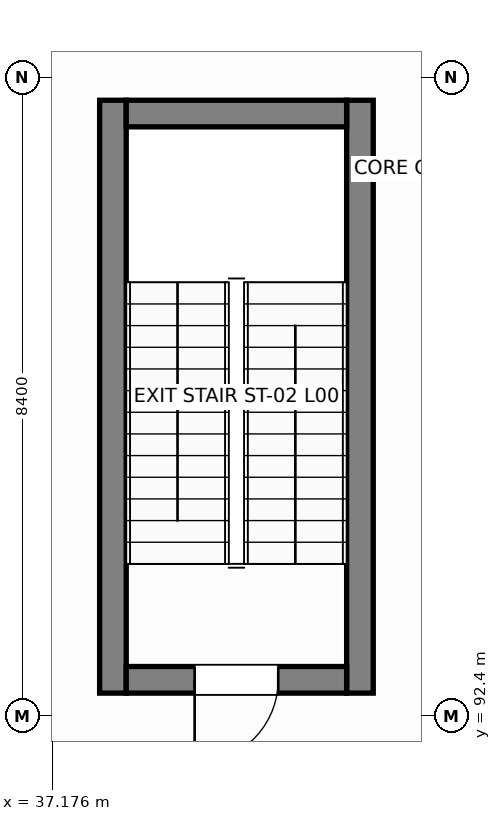
"""IFC4 building model, lengths in metres.
Left out: names, types, materials, properties, quantities, classifications, styles, units other than length and angle.
Written with IfcOpenShell. Run it as: python <this file> out.ifc"""

import sys

from ifc_helpers import new_model, si_unit, direction, frame, frame_2d, origin, place, context, subcontext, project, spatial, rectangle, extrude, element, fill, save


model = new_model("IFC4")
c1 = context("Model", 3, precision=1e-05, world=origin(), true_north=direction((0.0, 1.0)))
c2 = subcontext(c1, "Body", "Model", "MODEL_VIEW")
j1 = project(units=[si_unit("LENGTHUNIT", "METRE"), si_unit("PLANEANGLEUNIT", "RADIAN")], contexts=[c1])
p1 = place(None, origin())
s1 = spatial("IfcSite", under=j1, at=p1, CompositionType="ELEMENT")
p2 = place(p1, origin())
s2 = spatial("IfcBuilding", under=s1, at=p2, CompositionType="ELEMENT")
p3 = place(p2, origin())
s3 = spatial("IfcBuildingStorey", under=s2, at=p3, CompositionType="ELEMENT", Elevation=0.0)
for number, where, z_axis, x_axis in (
    (1, (37.975, 92.7, 0.0), (0.0, 0.0, 1.0), (0.0, 1.0, 0.0)),
    (2, (41.225, 92.7, 0.0), (0.0, 0.0, 1.0), (0.0, 1.0, 0.0)),
):
    element("IfcWall", number, at=place(p3, frame(where, z_axis=z_axis, x_axis=x_axis)), inside=s3, PredefinedType="SHEAR", context=c2, shape_type="SweptSolid", body=[
        extrude(rectangle(XDim=7.8, YDim=0.35, at=frame_2d((3.9, 0.0))), origin(), (0.0, 0.0, 1.0), 4.58),
    ])
p4 = place(p3, frame((38.15, 100.325, 0.0), z_axis=(0.0, 0.0, 1.0), x_axis=(1.0, 0.0, 0.0)))
e3 = element("IfcWall", 3, at=p4, inside=s3, PredefinedType="SHEAR", context=c2, shape_type="SweptSolid", body=[
    extrude(rectangle(XDim=2.9, YDim=0.35, at=frame_2d((1.45, 0.0))), origin(), (0.0, 0.0, 1.0), 4.58),
])
p5 = place(p3, frame((38.15, 92.875, 0.0), z_axis=(0.0, 0.0, 1.0), x_axis=(1.0, 0.0, 0.0)))
e4 = element("IfcWall", 4, at=p5, inside=s3, PredefinedType="SHEAR", context=c2, shape_type="SweptSolid", body=[
    extrude(rectangle(XDim=2.9, YDim=0.35, at=frame_2d((1.45, 0.0))), origin(), (0.0, 0.0, 1.0), 4.58),
])
p6 = place(p5, frame((0.9, 0.0, 0.0)))
e5 = element("IfcOpeningElement", 5, at=p6, cuts=e4, PredefinedType="OPENING", context=c2, shape_type="SweptSolid", body=[
    extrude(rectangle(XDim=1.1, YDim=2.15, at=frame_2d((0.55, 1.075))), frame((0.0, 0.185, 0.0), z_axis=(0.0, -1.0, 0.0), x_axis=(1.0, 0.0, 0.0)), (0.0, 0.0, 1.0), 0.37),
])
p7 = place(p6, frame((1.1, 0.0, 0.0), z_axis=(0.0, 0.0, 1.0), x_axis=(-1.0, 0.0, 0.0)))
e6 = element("IfcDoor", 6, at=p7, inside=s3, OperationType="SINGLE_SWING_RIGHT", PredefinedType="DOOR", context=c2, shape_type="SweptSolid", body=[
    extrude(rectangle(XDim=1.1, YDim=2.15, at=frame_2d((0.55, 1.075))), frame((0.0, 0.025, 0.0), z_axis=(0.0, -1.0, 0.0), x_axis=(1.0, 0.0, 0.0)), (0.0, 0.0, 1.0), 0.05),
])
fill(e5, e6)
save(model, sys.argv[1])
